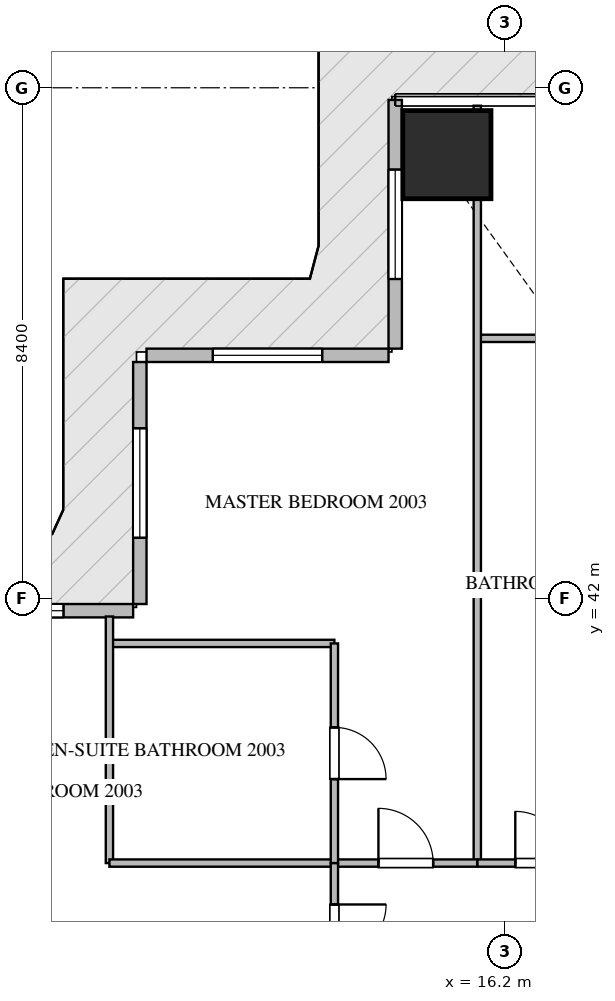
"""IFC4 building model, lengths in metres.
Left out: names, types, materials, properties, quantities, classifications, styles, units other than length and angle.
Written with IfcOpenShell. Run it as: python <this file> out.ifc"""

import sys

from ifc_helpers import new_model, si_unit, direction, frame, frame_2d, origin, origin_2d, place, context, subcontext, project, spatial, rectangle, extrude, source, transform, mapped, element, fill, save


model = new_model("IFC4")
c1 = context("Model", 3, precision=1e-05, world=origin(), true_north=direction((0.0, 1.0)))
c2 = subcontext(c1, "Body", "Model", "MODEL_VIEW")
j1 = project(units=[si_unit("LENGTHUNIT", "METRE"), si_unit("PLANEANGLEUNIT", "RADIAN")], contexts=[c1])
p1 = place(None, origin())
s1 = spatial("IfcSite", under=j1, at=p1, CompositionType="ELEMENT")
p2 = place(p1, origin())
s2 = spatial("IfcBuilding", under=s1, at=p2, CompositionType="ELEMENT")
p3 = place(p2, frame((0.0, 0.0, 82.95)))
s3 = spatial("IfcBuildingStorey", under=s2, at=p3, CompositionType="ELEMENT", Elevation=82.95)
m1 = source(origin(), c2, "Body", "SweptSolid", [
    extrude(rectangle(XDim=1.45, YDim=1.45, at=origin_2d()), origin(), (0.0, 0.0, 1.0), 3.75),
])
p4 = place(p3, frame((15.25, 49.3, -0.26), z_axis=(0.0, 0.0, 1.0), x_axis=(1.0, 0.0, 0.0)))
e1 = element("IfcColumn", 1, at=p4, inside=s3, PredefinedType="COLUMN", context=c2, shape_type="MappedRepresentation", body=[
    mapped(m1, transform((0.0, 0.0, 0.0), scale=1.0)),
])
p5 = place(p3, frame((14.4, 50.2, 0.0), z_axis=(0.0, 0.0, 1.0), x_axis=(0.0, -1.0, 0.0)))
e2 = element("IfcWall", 2, at=p5, inside=s3, PredefinedType="ELEMENTEDWALL", context=c2, shape_type="SweptSolid", body=[
    extrude(rectangle(XDim=4.09, YDim=0.22, at=frame_2d((2.045, 0.0))), origin(), (0.0, 0.0, 1.0), 3.475),
])
p6 = place(p5, frame((1.145, 0.0, 0.65)))
e3 = element("IfcOpeningElement", 3, at=p6, cuts=e2, PredefinedType="OPENING", context=c2, shape_type="SweptSolid", body=[
    extrude(rectangle(XDim=1.8, YDim=2.1, at=frame_2d((0.9, 1.05))), frame((0.0, 0.12, 0.0), z_axis=(0.0, -1.0, 0.0), x_axis=(1.0, 0.0, 0.0)), (0.0, 0.0, 1.0), 0.24),
])
p7 = place(p3, frame((14.29, 46.0, 0.0), z_axis=(0.0, 0.0, 1.0), x_axis=(-1.0, 0.0, 0.0)))
e4 = element("IfcWall", 4, at=p7, inside=s3, PredefinedType="ELEMENTEDWALL", context=c2, shape_type="SweptSolid", body=[
    extrude(rectangle(XDim=3.98, YDim=0.22, at=frame_2d((1.99, 0.0))), origin(), (0.0, 0.0, 1.0), 3.475),
])
p8 = place(p7, frame((1.09, 0.0, 0.65)))
e5 = element("IfcOpeningElement", 5, at=p8, cuts=e4, PredefinedType="OPENING", context=c2, shape_type="SweptSolid", body=[
    extrude(rectangle(XDim=1.8, YDim=2.1, at=frame_2d((0.9, 1.05))), frame((0.0, 0.12, 0.0), z_axis=(0.0, -1.0, 0.0), x_axis=(1.0, 0.0, 0.0)), (0.0, 0.0, 1.0), 0.24),
])
p9 = place(p3, frame((10.2, 45.89, 0.0), z_axis=(0.0, 0.0, 1.0), x_axis=(0.0, -1.0, 0.0)))
e6 = element("IfcWall", 6, at=p9, inside=s3, PredefinedType="ELEMENTEDWALL", context=c2, shape_type="SweptSolid", body=[
    extrude(rectangle(XDim=3.98, YDim=0.22, at=frame_2d((1.99, 0.0))), origin(), (0.0, 0.0, 1.0), 3.475),
])
p10 = place(p9, frame((1.09, 0.0, 0.65)))
e7 = element("IfcOpeningElement", 7, at=p10, cuts=e6, PredefinedType="OPENING", context=c2, shape_type="SweptSolid", body=[
    extrude(rectangle(XDim=1.8, YDim=2.1, at=frame_2d((0.9, 1.05))), frame((0.0, 0.12, 0.0), z_axis=(0.0, -1.0, 0.0), x_axis=(1.0, 0.0, 0.0)), (0.0, 0.0, 1.0), 0.24),
])
p11 = place(p3, frame((10.09, 41.8, 0.0), z_axis=(0.0, 0.0, 1.0), x_axis=(-1.0, 0.0, 0.0)))
e8 = element("IfcWall", 8, at=p11, inside=s3, PredefinedType="ELEMENTEDWALL", context=c2, shape_type="SweptSolid", body=[
    extrude(rectangle(XDim=4.09, YDim=0.22, at=frame_2d((2.045, 0.0))), origin(), (0.0, 0.0, 1.0), 3.475),
])
p12 = place(p11, frame((1.145, 0.0, 0.65)))
e9 = element("IfcOpeningElement", 9, at=p12, cuts=e8, PredefinedType="OPENING", context=c2, shape_type="SweptSolid", body=[
    extrude(rectangle(XDim=1.8, YDim=2.1, at=frame_2d((0.9, 1.05))), frame((0.0, 0.12, 0.0), z_axis=(0.0, -1.0, 0.0), x_axis=(1.0, 0.0, 0.0)), (0.0, 0.0, 1.0), 0.24),
])
p13 = place(p3, frame((15.75, 46.279, 0.0), z_axis=(0.0, 0.0, 1.0), x_axis=(1.0, 0.0, 0.0)))
e10 = element("IfcWall", 10, at=p13, inside=s3, PredefinedType="PARTITIONING", context=c2, shape_type="SweptSolid", body=[
    extrude(rectangle(XDim=5.15, YDim=0.12, at=frame_2d((2.575, 0.0))), origin(), (0.0, 0.0, 1.0), 3.49),
])
p14 = place(p3, frame((15.75, 50.105, 0.0), z_axis=(0.0, 0.0, 1.0), x_axis=(0.0, -1.0, 0.0)))
e11 = element("IfcWall", 11, at=p14, inside=s3, PredefinedType="PARTITIONING", context=c2, shape_type="SweptSolid", body=[
    extrude(rectangle(XDim=12.455, YDim=0.12, at=frame_2d((6.228, 0.0))), origin(), (0.0, 0.0, 1.0), 3.49),
])
p15 = place(p3, frame((15.75, 37.65, 0.0), z_axis=(0.0, 0.0, 1.0), x_axis=(1.0, 0.0, 0.0)))
e12 = element("IfcWall", 12, at=p15, inside=s3, PredefinedType="PARTITIONING", context=c2, shape_type="SweptSolid", body=[
    extrude(rectangle(XDim=2.1, YDim=0.12, at=frame_2d((1.05, 0.0))), origin(), (0.0, 0.0, 1.0), 3.49),
])
p16 = place(p15, frame((0.625, 0.0, 0.0)))
e13 = element("IfcOpeningElement", 13, at=p16, cuts=e12, PredefinedType="OPENING", context=c2, shape_type="SweptSolid", body=[
    extrude(rectangle(XDim=0.85, YDim=2.1, at=frame_2d((0.425, 1.05))), frame((0.0, 0.07, 0.0), z_axis=(0.0, -1.0, 0.0), x_axis=(1.0, 0.0, 0.0)), (0.0, 0.0, 1.0), 0.14),
])
p17 = place(p3, frame((13.4, 37.65, 0.0), z_axis=(0.0, 0.0, 1.0), x_axis=(1.0, 0.0, 0.0)))
e14 = element("IfcWall", 14, at=p17, inside=s3, PredefinedType="PARTITIONING", context=c2, shape_type="SweptSolid", body=[
    extrude(rectangle(XDim=2.348, YDim=0.12, at=frame_2d((1.174, 0.0))), origin(), (0.0, 0.0, 1.0), 3.49),
])
p18 = place(p17, frame((0.724, 0.0, 0.0)))
e15 = element("IfcOpeningElement", 15, at=p18, cuts=e14, PredefinedType="OPENING", context=c2, shape_type="SweptSolid", body=[
    extrude(rectangle(XDim=0.9, YDim=2.1, at=frame_2d((0.45, 1.05))), frame((0.0, 0.07, 0.0), z_axis=(0.0, -1.0, 0.0), x_axis=(1.0, 0.0, 0.0)), (0.0, 0.0, 1.0), 0.14),
])
p19 = place(p3, frame((9.7, 41.262, 0.0), z_axis=(0.0, 0.0, 1.0), x_axis=(1.0, 0.0, 0.0)))
e16 = element("IfcWall", 16, at=p19, inside=s3, PredefinedType="PARTITIONING", context=c2, shape_type="SweptSolid", body=[
    extrude(rectangle(XDim=3.7, YDim=0.12, at=frame_2d((1.85, 0.0))), origin(), (0.0, 0.0, 1.0), 3.49),
])
p20 = place(p3, frame((9.7, 41.705, 0.0), z_axis=(0.0, 0.0, 1.0), x_axis=(0.0, -1.0, 0.0)))
e17 = element("IfcWall", 17, at=p20, inside=s3, PredefinedType="PARTITIONING", context=c2, shape_type="SweptSolid", body=[
    extrude(rectangle(XDim=4.055, YDim=0.12, at=frame_2d((2.028, 0.0))), origin(), (0.0, 0.0, 1.0), 3.49),
])
p21 = place(p3, frame((9.7, 37.65, 0.0), z_axis=(0.0, 0.0, 1.0), x_axis=(1.0, 0.0, 0.0)))
e18 = element("IfcWall", 18, at=p21, inside=s3, PredefinedType="PARTITIONING", context=c2, shape_type="SweptSolid", body=[
    extrude(rectangle(XDim=3.698, YDim=0.12, at=frame_2d((1.849, 0.0))), origin(), (0.0, 0.0, 1.0), 3.49),
])
p22 = place(p3, frame((13.4, 41.262, 0.0), z_axis=(0.0, 0.0, 1.0), x_axis=(0.0, -1.0, 0.0)))
e19 = element("IfcWall", 19, at=p22, inside=s3, PredefinedType="PARTITIONING", context=c2, shape_type="SweptSolid", body=[
    extrude(rectangle(XDim=3.612, YDim=0.12, at=frame_2d((1.806, 0.0))), origin(), (0.0, 0.0, 1.0), 3.49),
])
p23 = place(p22, frame((1.381, 0.0, 0.0)))
e20 = element("IfcOpeningElement", 20, at=p23, cuts=e19, PredefinedType="OPENING", context=c2, shape_type="SweptSolid", body=[
    extrude(rectangle(XDim=0.85, YDim=2.1, at=frame_2d((0.425, 1.05))), frame((0.0, 0.07, 0.0), z_axis=(0.0, -1.0, 0.0), x_axis=(1.0, 0.0, 0.0)), (0.0, 0.0, 1.0), 0.14),
])
p24 = place(p3, frame((13.4, 37.648, 0.0), z_axis=(0.0, 0.0, 1.0), x_axis=(0.0, -1.0, 0.0)))
e21 = element("IfcWall", 21, at=p24, inside=s3, PredefinedType="PARTITIONING", context=c2, shape_type="SweptSolid", body=[
    extrude(rectangle(XDim=2.208, YDim=0.12, at=frame_2d((1.104, 0.0))), origin(), (0.0, 0.0, 1.0), 3.49),
])
p25 = place(p24, frame((0.679, 0.0, 0.0)))
e22 = element("IfcOpeningElement", 22, at=p25, cuts=e21, PredefinedType="OPENING", context=c2, shape_type="SweptSolid", body=[
    extrude(rectangle(XDim=0.85, YDim=2.1, at=frame_2d((0.425, 1.05))), frame((0.0, 0.07, 0.0), z_axis=(0.0, -1.0, 0.0), x_axis=(1.0, 0.0, 0.0)), (0.0, 0.0, 1.0), 0.14),
])
m2 = source(origin(), c2, "Body", "SweptSolid", [
    extrude(rectangle(XDim=1.8, YDim=2.1, at=frame_2d((0.9, 1.05))), frame((0.0, 0.03, 0.0), z_axis=(0.0, -1.0, 0.0), x_axis=(1.0, 0.0, 0.0)), (0.0, 0.0, 1.0), 0.06),
])
p26 = place(p6, origin())
e23 = element("IfcWindow", 23, at=p26, inside=s3, PartitioningType="SINGLE_PANEL", PredefinedType="WINDOW", context=c2, shape_type="MappedRepresentation", body=[
    mapped(m2, transform((0.0, 0.0, 0.0), scale=1.0)),
])
fill(e3, e23)
p27 = place(p8, origin())
e24 = element("IfcWindow", 24, at=p27, inside=s3, PartitioningType="SINGLE_PANEL", PredefinedType="WINDOW", context=c2, shape_type="MappedRepresentation", body=[
    mapped(m2, transform((0.0, 0.0, 0.0), scale=1.0)),
])
fill(e5, e24)
p28 = place(p10, origin())
e25 = element("IfcWindow", 25, at=p28, inside=s3, PartitioningType="SINGLE_PANEL", PredefinedType="WINDOW", context=c2, shape_type="MappedRepresentation", body=[
    mapped(m2, transform((0.0, 0.0, 0.0), scale=1.0)),
])
fill(e7, e25)
p29 = place(p12, origin())
e26 = element("IfcWindow", 26, at=p29, inside=s3, PartitioningType="SINGLE_PANEL", PredefinedType="WINDOW", context=c2, shape_type="MappedRepresentation", body=[
    mapped(m2, transform((0.0, 0.0, 0.0), scale=1.0)),
])
fill(e9, e26)
m3 = source(origin(), c2, "Body", "SweptSolid", [
    extrude(rectangle(XDim=0.85, YDim=2.1, at=frame_2d((0.425, 1.05))), frame((0.0, 0.025, 0.0), z_axis=(0.0, -1.0, 0.0), x_axis=(1.0, 0.0, 0.0)), (0.0, 0.0, 1.0), 0.05),
])
p30 = place(p16, origin())
e27 = element("IfcDoor", 27, at=p30, inside=s3, OperationType="SINGLE_SWING_LEFT", PredefinedType="DOOR", context=c2, shape_type="MappedRepresentation", body=[
    mapped(m3, transform((0.0, 0.0, 0.0), scale=1.0)),
])
fill(e13, e27)
m4 = source(origin(), c2, "Body", "SweptSolid", [
    extrude(rectangle(XDim=0.9, YDim=2.1, at=frame_2d((0.45, 1.05))), frame((0.0, 0.025, 0.0), z_axis=(0.0, -1.0, 0.0), x_axis=(1.0, 0.0, 0.0)), (0.0, 0.0, 1.0), 0.05),
])
p31 = place(p18, origin())
e28 = element("IfcDoor", 28, at=p31, inside=s3, OperationType="SINGLE_SWING_LEFT", PredefinedType="DOOR", context=c2, shape_type="MappedRepresentation", body=[
    mapped(m4, transform((0.0, 0.0, 0.0), scale=1.0)),
])
fill(e15, e28)
p32 = place(p23, origin())
e29 = element("IfcDoor", 29, at=p32, inside=s3, OperationType="SINGLE_SWING_RIGHT", PredefinedType="DOOR", context=c2, shape_type="MappedRepresentation", body=[
    mapped(m3, transform((0.0, 0.0, 0.0), scale=1.0)),
])
fill(e20, e29)
p33 = place(p25, origin())
e30 = element("IfcDoor", 30, at=p33, inside=s3, OperationType="SINGLE_SWING_LEFT", PredefinedType="DOOR", context=c2, shape_type="MappedRepresentation", body=[
    mapped(m3, transform((0.0, 0.0, 0.0), scale=1.0)),
])
fill(e22, e30)
save(model, sys.argv[1])
